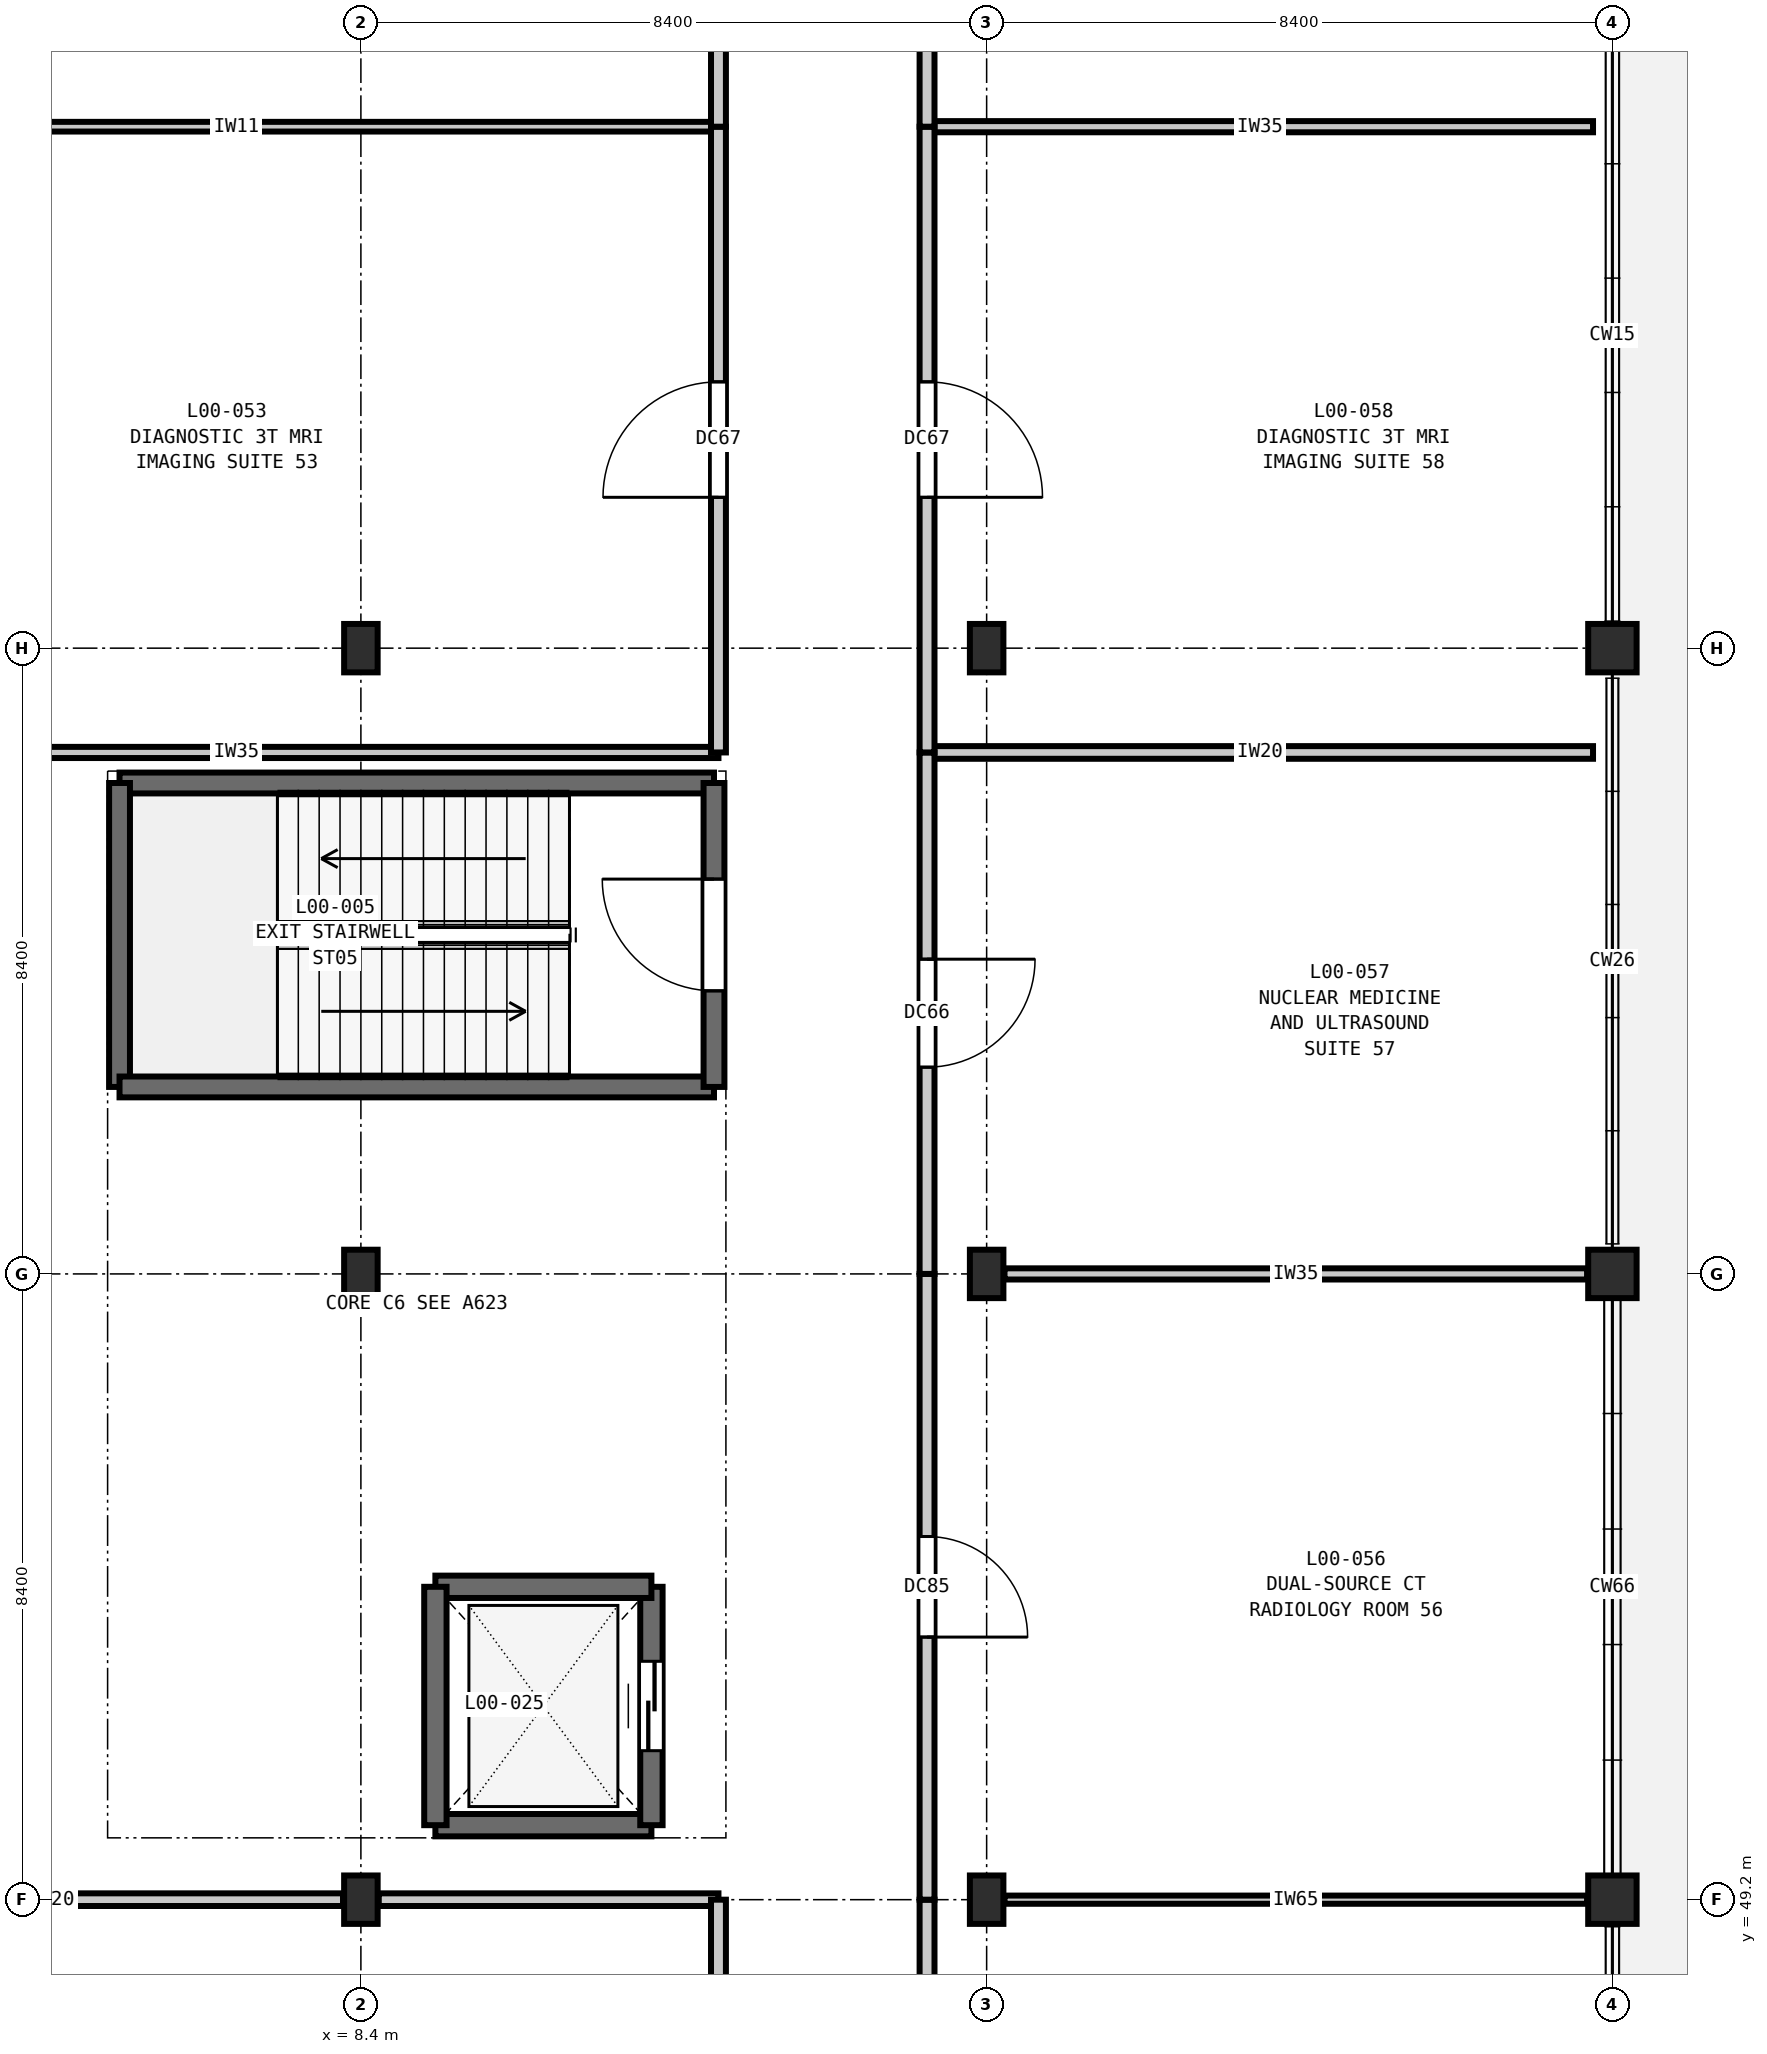
"""IFC4 building model, lengths in metres.
Left out: names, types, materials, properties, quantities, classifications, styles, units other than length and angle.
Written with IfcOpenShell. Run it as: python <this file> out.ifc"""

import sys

from ifc_helpers import new_model, si_unit, direction, frame, frame_2d, origin, origin_2d, place, context, subcontext, project, spatial, rectangle, extrude, element, fill, save


model = new_model("IFC4")
c1 = context("Model", 3, precision=1e-05, world=origin(), true_north=direction((0.0, 1.0)))
c2 = subcontext(c1, "Body", "Model", "MODEL_VIEW")
j1 = project(units=[si_unit("LENGTHUNIT", "METRE"), si_unit("PLANEANGLEUNIT", "RADIAN")], contexts=[c1])
p1 = place(None, origin())
s1 = spatial("IfcSite", under=j1, at=p1, CompositionType="ELEMENT")
p2 = place(p1, origin())
s2 = spatial("IfcBuilding", under=s1, at=p2, CompositionType="ELEMENT")
p3 = place(p2, origin())
s3 = spatial("IfcBuildingStorey", under=s2, at=p3, CompositionType="ELEMENT", Elevation=0.0)
for number, where, z_axis, x_axis in (
    (1, (8.4, 49.2, 0.0), (0.0, 0.0, 1.0), (1.0, 0.0, 0.0)),
    (2, (8.4, 57.6, 0.0), (0.0, 0.0, 1.0), (1.0, 0.0, 0.0)),
    (3, (8.4, 66.0, 0.0), (0.0, 0.0, 1.0), (1.0, 0.0, 0.0)),
    (4, (16.8, 49.2, 0.0), (0.0, 0.0, 1.0), (1.0, 0.0, 0.0)),
    (5, (16.8, 57.6, 0.0), (0.0, 0.0, 1.0), (1.0, 0.0, 0.0)),
    (6, (16.8, 66.0, 0.0), (0.0, 0.0, 1.0), (1.0, 0.0, 0.0)),
):
    element("IfcColumn", number, at=place(p3, frame(where, z_axis=z_axis, x_axis=x_axis)), inside=s3, PredefinedType="COLUMN", context=c2, shape_type="SweptSolid", body=[
        extrude(rectangle(XDim=0.45, YDim=0.65, at=origin_2d()), origin(), (0.0, 0.0, 1.0), 5.4),
    ])
for number, where, z_axis, x_axis in (
    (7, (25.2, 49.2, 0.0), (0.0, 0.0, 1.0), (1.0, 0.0, 0.0)),
    (8, (25.2, 57.6, 0.0), (0.0, 0.0, 1.0), (1.0, 0.0, 0.0)),
    (9, (25.2, 66.0, 0.0), (0.0, 0.0, 1.0), (1.0, 0.0, 0.0)),
):
    element("IfcColumn", number, at=place(p3, frame(where, z_axis=z_axis, x_axis=x_axis)), inside=s3, PredefinedType="COLUMN", context=c2, shape_type="SweptSolid", body=[
        extrude(rectangle(XDim=0.65, YDim=0.65, at=origin_2d()), origin(), (0.0, 0.0, 1.0), 5.4),
    ])
p4 = place(p3, frame((13.14, 64.19, 0.0), z_axis=(0.0, 0.0, 1.0), x_axis=(-1.0, 0.0, 0.0)))
e10 = element("IfcWall", 10, at=p4, inside=s3, PredefinedType="SHEAR", context=c2, shape_type="SweptSolid", body=[
    extrude(rectangle(XDim=7.98, YDim=0.28, at=frame_2d((3.99, 0.0))), origin(), (0.0, 0.0, 1.0), 5.4),
])
p5 = place(p3, frame((5.16, 64.19, 0.0), z_axis=(0.0, 0.0, 1.0), x_axis=(0.0, -1.0, 0.0)))
e11 = element("IfcWall", 11, at=p5, inside=s3, PredefinedType="SHEAR", context=c2, shape_type="SweptSolid", body=[
    extrude(rectangle(XDim=4.08, YDim=0.28, at=frame_2d((2.04, 0.0))), origin(), (0.0, 0.0, 1.0), 5.4),
])
p6 = place(p3, frame((5.16, 60.11, 0.0), z_axis=(0.0, 0.0, 1.0), x_axis=(1.0, 0.0, 0.0)))
e12 = element("IfcWall", 12, at=p6, inside=s3, PredefinedType="SHEAR", context=c2, shape_type="SweptSolid", body=[
    extrude(rectangle(XDim=7.98, YDim=0.28, at=frame_2d((3.99, 0.0))), origin(), (0.0, 0.0, 1.0), 5.4),
])
p7 = place(p3, frame((13.14, 60.11, 0.0), z_axis=(0.0, 0.0, 1.0), x_axis=(0.0, 1.0, 0.0)))
e13 = element("IfcWall", 13, at=p7, inside=s3, PredefinedType="SHEAR", context=c2, shape_type="SweptSolid", body=[
    extrude(rectangle(XDim=4.08, YDim=0.28, at=frame_2d((2.04, 0.0))), origin(), (0.0, 0.0, 1.0), 5.4),
])
p8 = place(p7, frame((1.29, 0.0, 0.0)))
e14 = element("IfcOpeningElement", 14, at=p8, cuts=e13, PredefinedType="OPENING", context=c2, shape_type="SweptSolid", body=[
    extrude(rectangle(XDim=1.5, YDim=2.2, at=frame_2d((0.75, 1.1))), frame((0.0, 0.15, 0.0), z_axis=(0.0, -1.0, 0.0), x_axis=(1.0, 0.0, 0.0)), (0.0, 0.0, 1.0), 0.3),
])
p9 = place(p3, frame((9.4, 50.2, 0.0), z_axis=(0.0, 0.0, 1.0), x_axis=(1.0, 0.0, 0.0)))
e15 = element("IfcWall", 15, at=p9, inside=s3, PredefinedType="SHEAR", context=c2, shape_type="SweptSolid", body=[
    extrude(rectangle(XDim=2.9, YDim=0.3, at=frame_2d((1.45, 0.0))), origin(), (0.0, 0.0, 1.0), 5.4),
])
p10 = place(p3, frame((12.3, 50.2, 0.0), z_axis=(0.0, 0.0, 1.0), x_axis=(0.0, 1.0, 0.0)))
e16 = element("IfcWall", 16, at=p10, inside=s3, PredefinedType="SHEAR", context=c2, shape_type="SweptSolid", body=[
    extrude(rectangle(XDim=3.2, YDim=0.3, at=frame_2d((1.6, 0.0))), origin(), (0.0, 0.0, 1.0), 5.4),
])
p11 = place(p10, frame((1.0, 0.0, 0.0)))
e17 = element("IfcOpeningElement", 17, at=p11, cuts=e16, PredefinedType="OPENING", context=c2, shape_type="SweptSolid", body=[
    extrude(rectangle(XDim=1.2, YDim=2.2, at=frame_2d((0.6, 1.1))), frame((0.0, 0.16, 0.0), z_axis=(0.0, -1.0, 0.0), x_axis=(1.0, 0.0, 0.0)), (0.0, 0.0, 1.0), 0.32),
])
p12 = place(p3, frame((12.3, 53.4, 0.0), z_axis=(0.0, 0.0, 1.0), x_axis=(-1.0, 0.0, 0.0)))
e18 = element("IfcWall", 18, at=p12, inside=s3, PredefinedType="SHEAR", context=c2, shape_type="SweptSolid", body=[
    extrude(rectangle(XDim=2.9, YDim=0.3, at=frame_2d((1.45, 0.0))), origin(), (0.0, 0.0, 1.0), 5.4),
])
p13 = place(p3, frame((9.4, 53.4, 0.0), z_axis=(0.0, 0.0, 1.0), x_axis=(0.0, -1.0, 0.0)))
e19 = element("IfcWall", 19, at=p13, inside=s3, PredefinedType="SHEAR", context=c2, shape_type="SweptSolid", body=[
    extrude(rectangle(XDim=3.2, YDim=0.3, at=frame_2d((1.6, 0.0))), origin(), (0.0, 0.0, 1.0), 5.4),
])
p14 = place(p3, frame((0.34, 49.2, 0.0), z_axis=(0.0, 0.0, 1.0), x_axis=(1.0, 0.0, 0.0)))
e20 = element("IfcWall", 20, at=p14, inside=s3, PredefinedType="PARTITIONING", context=c2, shape_type="SweptSolid", body=[
    extrude(rectangle(XDim=7.82, YDim=0.17, at=frame_2d((3.91, 0.0))), origin(), (0.0, 0.0, 1.0), 4.635),
])
p15 = place(p3, frame((8.64, 49.2, 0.0), z_axis=(0.0, 0.0, 1.0), x_axis=(1.0, 0.0, 0.0)))
e21 = element("IfcWall", 21, at=p15, inside=s3, PredefinedType="PARTITIONING", context=c2, shape_type="SweptSolid", body=[
    extrude(rectangle(XDim=4.56, YDim=0.17, at=frame_2d((2.28, 0.0))), origin(), (0.0, 0.0, 1.0), 4.635),
])
p16 = place(p3, frame((17.04, 49.2, 0.0), z_axis=(0.0, 0.0, 1.0), x_axis=(1.0, 0.0, 0.0)))
e22 = element("IfcWall", 22, at=p16, inside=s3, PredefinedType="PARTITIONING", context=c2, shape_type="SweptSolid", body=[
    extrude(rectangle(XDim=7.82, YDim=0.11, at=frame_2d((3.91, 0.0))), origin(), (0.0, 0.0, 1.0), 4.635),
])
p17 = place(p3, frame((17.04, 57.6, 0.0), z_axis=(0.0, 0.0, 1.0), x_axis=(1.0, 0.0, 0.0)))
e23 = element("IfcWall", 23, at=p17, inside=s3, PredefinedType="PARTITIONING", context=c2, shape_type="SweptSolid", body=[
    extrude(rectangle(XDim=7.82, YDim=0.15, at=frame_2d((3.91, 0.0))), origin(), (0.0, 0.0, 1.0), 4.635),
])
p18 = place(p3, frame((0.26, 64.6, 0.0), z_axis=(0.0, 0.0, 1.0), x_axis=(1.0, 0.0, 0.0)))
e24 = element("IfcWall", 24, at=p18, inside=s3, PredefinedType="PARTITIONING", context=c2, shape_type="SweptSolid", body=[
    extrude(rectangle(XDim=12.94, YDim=0.15, at=frame_2d((6.47, 0.0))), origin(), (0.0, 0.0, 1.0), 5.04),
])
p19 = place(p3, frame((16.0, 64.6, 0.0), z_axis=(0.0, 0.0, 1.0), x_axis=(1.0, 0.0, 0.0)))
e25 = element("IfcWall", 25, at=p19, inside=s3, PredefinedType="PARTITIONING", context=c2, shape_type="SweptSolid", body=[
    extrude(rectangle(XDim=8.94, YDim=0.17, at=frame_2d((4.47, 0.0))), origin(), (0.0, 0.0, 1.0), 5.04),
])
p20 = place(p3, frame((0.26, 73.0, 0.0), z_axis=(0.0, 0.0, 1.0), x_axis=(1.0, 0.0, 0.0)))
e26 = element("IfcWall", 26, at=p20, inside=s3, PredefinedType="PARTITIONING", context=c2, shape_type="SweptSolid", body=[
    extrude(rectangle(XDim=12.94, YDim=0.13, at=frame_2d((6.47, 0.0))), origin(), (0.0, 0.0, 1.0), 5.04),
])
p21 = place(p3, frame((16.0, 73.0, 0.0), z_axis=(0.0, 0.0, 1.0), x_axis=(1.0, 0.0, 0.0)))
e27 = element("IfcWall", 27, at=p21, inside=s3, PredefinedType="PARTITIONING", context=c2, shape_type="SweptSolid", body=[
    extrude(rectangle(XDim=8.94, YDim=0.15, at=frame_2d((4.47, 0.0))), origin(), (0.0, 0.0, 1.0), 5.04),
])
p22 = place(p3, frame((13.2, 40.8, 0.0), z_axis=(0.0, 0.0, 1.0), x_axis=(0.0, 1.0, 0.0)))
e28 = element("IfcWall", 28, at=p22, inside=s3, PredefinedType="PARTITIONING", context=c2, shape_type="SweptSolid", body=[
    extrude(rectangle(XDim=8.4, YDim=0.2, at=frame_2d((4.2, 0.0))), origin(), (0.0, 0.0, 1.0), 5.04),
])
p23 = place(p22, frame((3.475, 0.0, 0.0)))
e29 = element("IfcOpeningElement", 29, at=p23, cuts=e28, PredefinedType="OPENING", context=c2, shape_type="SweptSolid", body=[
    extrude(rectangle(XDim=1.45, YDim=2.25, at=frame_2d((0.725, 1.125))), frame((0.0, 0.11, 0.0), z_axis=(0.0, -1.0, 0.0), x_axis=(1.0, 0.0, 0.0)), (0.0, 0.0, 1.0), 0.22),
])
p24 = place(p3, frame((13.2, 64.6, 0.0), z_axis=(0.0, 0.0, 1.0), x_axis=(0.0, 1.0, 0.0)))
e30 = element("IfcWall", 30, at=p24, inside=s3, PredefinedType="PARTITIONING", context=c2, shape_type="SweptSolid", body=[
    extrude(rectangle(XDim=8.4, YDim=0.2, at=frame_2d((4.2, 0.0))), origin(), (0.0, 0.0, 1.0), 5.04),
])
p25 = place(p24, frame((3.425, 0.0, 0.0)))
e31 = element("IfcOpeningElement", 31, at=p25, cuts=e30, PredefinedType="OPENING", context=c2, shape_type="SweptSolid", body=[
    extrude(rectangle(XDim=1.55, YDim=2.25, at=frame_2d((0.775, 1.125))), frame((0.0, 0.11, 0.0), z_axis=(0.0, -1.0, 0.0), x_axis=(1.0, 0.0, 0.0)), (0.0, 0.0, 1.0), 0.22),
])
p26 = place(p3, frame((13.2, 73.0, 0.0), z_axis=(0.0, 0.0, 1.0), x_axis=(0.0, 1.0, 0.0)))
e32 = element("IfcWall", 32, at=p26, inside=s3, PredefinedType="PARTITIONING", context=c2, shape_type="SweptSolid", body=[
    extrude(rectangle(XDim=9.8, YDim=0.2, at=frame_2d((4.9, 0.0))), origin(), (0.0, 0.0, 1.0), 5.04),
])
p27 = place(p26, frame((4.05, 0.0, 0.0)))
e33 = element("IfcOpeningElement", 33, at=p27, cuts=e32, PredefinedType="OPENING", context=c2, shape_type="SweptSolid", body=[
    extrude(rectangle(XDim=1.7, YDim=2.3, at=frame_2d((0.85, 1.15))), frame((0.0, 0.11, 0.0), z_axis=(0.0, -1.0, 0.0), x_axis=(1.0, 0.0, 0.0)), (0.0, 0.0, 1.0), 0.22),
])
p28 = place(p3, frame((16.0, 40.8, 0.0), z_axis=(0.0, 0.0, 1.0), x_axis=(0.0, 1.0, 0.0)))
e34 = element("IfcWall", 34, at=p28, inside=s3, PredefinedType="PARTITIONING", context=c2, shape_type="SweptSolid", body=[
    extrude(rectangle(XDim=8.4, YDim=0.2, at=frame_2d((4.2, 0.0))), origin(), (0.0, 0.0, 1.0), 5.04),
])
p29 = place(p28, frame((3.55, 0.0, 0.0)))
e35 = element("IfcOpeningElement", 35, at=p29, cuts=e34, PredefinedType="OPENING", context=c2, shape_type="SweptSolid", body=[
    extrude(rectangle(XDim=1.3, YDim=2.2, at=frame_2d((0.65, 1.1))), frame((0.0, 0.11, 0.0), z_axis=(0.0, -1.0, 0.0), x_axis=(1.0, 0.0, 0.0)), (0.0, 0.0, 1.0), 0.22),
])
p30 = place(p3, frame((16.0, 49.2, 0.0), z_axis=(0.0, 0.0, 1.0), x_axis=(0.0, 1.0, 0.0)))
e36 = element("IfcWall", 36, at=p30, inside=s3, PredefinedType="PARTITIONING", context=c2, shape_type="SweptSolid", body=[
    extrude(rectangle(XDim=8.4, YDim=0.2, at=frame_2d((4.2, 0.0))), origin(), (0.0, 0.0, 1.0), 5.04),
])
p31 = place(p30, frame((3.525, 0.0, 0.0)))
e37 = element("IfcOpeningElement", 37, at=p31, cuts=e36, PredefinedType="OPENING", context=c2, shape_type="SweptSolid", body=[
    extrude(rectangle(XDim=1.35, YDim=2.2, at=frame_2d((0.675, 1.1))), frame((0.0, 0.11, 0.0), z_axis=(0.0, -1.0, 0.0), x_axis=(1.0, 0.0, 0.0)), (0.0, 0.0, 1.0), 0.22),
])
p32 = place(p3, frame((16.0, 57.6, 0.0), z_axis=(0.0, 0.0, 1.0), x_axis=(0.0, 1.0, 0.0)))
e38 = element("IfcWall", 38, at=p32, inside=s3, PredefinedType="PARTITIONING", context=c2, shape_type="SweptSolid", body=[
    extrude(rectangle(XDim=7.0, YDim=0.2, at=frame_2d((3.5, 0.0))), origin(), (0.0, 0.0, 1.0), 5.04),
])
p33 = place(p32, frame((2.775, 0.0, 0.0)))
e39 = element("IfcOpeningElement", 39, at=p33, cuts=e38, PredefinedType="OPENING", context=c2, shape_type="SweptSolid", body=[
    extrude(rectangle(XDim=1.45, YDim=2.25, at=frame_2d((0.725, 1.125))), frame((0.0, 0.11, 0.0), z_axis=(0.0, -1.0, 0.0), x_axis=(1.0, 0.0, 0.0)), (0.0, 0.0, 1.0), 0.22),
])
p34 = place(p3, frame((16.0, 64.6, 0.0), z_axis=(0.0, 0.0, 1.0), x_axis=(0.0, 1.0, 0.0)))
e40 = element("IfcWall", 40, at=p34, inside=s3, PredefinedType="PARTITIONING", context=c2, shape_type="SweptSolid", body=[
    extrude(rectangle(XDim=8.4, YDim=0.2, at=frame_2d((4.2, 0.0))), origin(), (0.0, 0.0, 1.0), 5.04),
])
p35 = place(p34, frame((3.425, 0.0, 0.0)))
e41 = element("IfcOpeningElement", 41, at=p35, cuts=e40, PredefinedType="OPENING", context=c2, shape_type="SweptSolid", body=[
    extrude(rectangle(XDim=1.55, YDim=2.25, at=frame_2d((0.775, 1.125))), frame((0.0, 0.11, 0.0), z_axis=(0.0, -1.0, 0.0), x_axis=(1.0, 0.0, 0.0)), (0.0, 0.0, 1.0), 0.22),
])
p36 = place(p3, frame((16.0, 73.0, 0.0), z_axis=(0.0, 0.0, 1.0), x_axis=(0.0, 1.0, 0.0)))
e42 = element("IfcWall", 42, at=p36, inside=s3, PredefinedType="PARTITIONING", context=c2, shape_type="SweptSolid", body=[
    extrude(rectangle(XDim=9.8, YDim=0.2, at=frame_2d((4.9, 0.0))), origin(), (0.0, 0.0, 1.0), 5.04),
])
p37 = place(p36, frame((4.05, 0.0, 0.0)))
e43 = element("IfcOpeningElement", 43, at=p37, cuts=e42, PredefinedType="OPENING", context=c2, shape_type="SweptSolid", body=[
    extrude(rectangle(XDim=1.7, YDim=2.3, at=frame_2d((0.85, 1.15))), frame((0.0, 0.11, 0.0), z_axis=(0.0, -1.0, 0.0), x_axis=(1.0, 0.0, 0.0)), (0.0, 0.0, 1.0), 0.22),
])
p38 = place(p8, origin())
e44 = element("IfcDoor", 44, at=p38, inside=s3, OperationType="SINGLE_SWING_RIGHT", PredefinedType="DOOR", context=c2, shape_type="SweptSolid", body=[
    extrude(rectangle(XDim=1.5, YDim=2.2, at=frame_2d((0.75, 1.1))), frame((0.0, 0.025, 0.0), z_axis=(0.0, -1.0, 0.0), x_axis=(1.0, 0.0, 0.0)), (0.0, 0.0, 1.0), 0.05),
])
fill(e14, e44)
p39 = place(p11, origin())
e45 = element("IfcDoor", 45, at=p39, inside=s3, OperationType="DOUBLE_DOOR_SLIDING", PredefinedType="DOOR", context=c2, shape_type="SweptSolid", body=[
    extrude(rectangle(XDim=1.2, YDim=2.2, at=frame_2d((0.6, 1.1))), frame((0.0, 0.025, 0.0), z_axis=(0.0, -1.0, 0.0), x_axis=(1.0, 0.0, 0.0)), (0.0, 0.0, 1.0), 0.05),
])
fill(e17, e45)
p40 = place(p25, origin())
e46 = element("IfcDoor", 46, at=p40, inside=s3, OperationType="SINGLE_SWING_LEFT", PredefinedType="DOOR", context=c2, shape_type="SweptSolid", body=[
    extrude(rectangle(XDim=1.55, YDim=2.25, at=frame_2d((0.775, 1.125))), frame((0.0, 0.025, 0.0), z_axis=(0.0, -1.0, 0.0), x_axis=(1.0, 0.0, 0.0)), (0.0, 0.0, 1.0), 0.05),
])
fill(e31, e46)
p41 = place(p31, frame((1.35, 0.0, 0.0), z_axis=(0.0, 0.0, 1.0), x_axis=(-1.0, 0.0, 0.0)))
e47 = element("IfcDoor", 47, at=p41, inside=s3, OperationType="SINGLE_SWING_RIGHT", PredefinedType="DOOR", context=c2, shape_type="SweptSolid", body=[
    extrude(rectangle(XDim=1.35, YDim=2.2, at=frame_2d((0.675, 1.1))), frame((0.0, 0.025, 0.0), z_axis=(0.0, -1.0, 0.0), x_axis=(1.0, 0.0, 0.0)), (0.0, 0.0, 1.0), 0.05),
])
fill(e37, e47)
p42 = place(p33, frame((1.45, 0.0, 0.0), z_axis=(0.0, 0.0, 1.0), x_axis=(-1.0, 0.0, 0.0)))
e48 = element("IfcDoor", 48, at=p42, inside=s3, OperationType="SINGLE_SWING_LEFT", PredefinedType="DOOR", context=c2, shape_type="SweptSolid", body=[
    extrude(rectangle(XDim=1.45, YDim=2.25, at=frame_2d((0.725, 1.125))), frame((0.0, 0.025, 0.0), z_axis=(0.0, -1.0, 0.0), x_axis=(1.0, 0.0, 0.0)), (0.0, 0.0, 1.0), 0.05),
])
fill(e39, e48)
p43 = place(p35, frame((1.55, 0.0, 0.0), z_axis=(0.0, 0.0, 1.0), x_axis=(-1.0, 0.0, 0.0)))
e49 = element("IfcDoor", 49, at=p43, inside=s3, OperationType="SINGLE_SWING_RIGHT", PredefinedType="DOOR", context=c2, shape_type="SweptSolid", body=[
    extrude(rectangle(XDim=1.55, YDim=2.25, at=frame_2d((0.775, 1.125))), frame((0.0, 0.025, 0.0), z_axis=(0.0, -1.0, 0.0), x_axis=(1.0, 0.0, 0.0)), (0.0, 0.0, 1.0), 0.05),
])
fill(e41, e49)
save(model, sys.argv[1])
